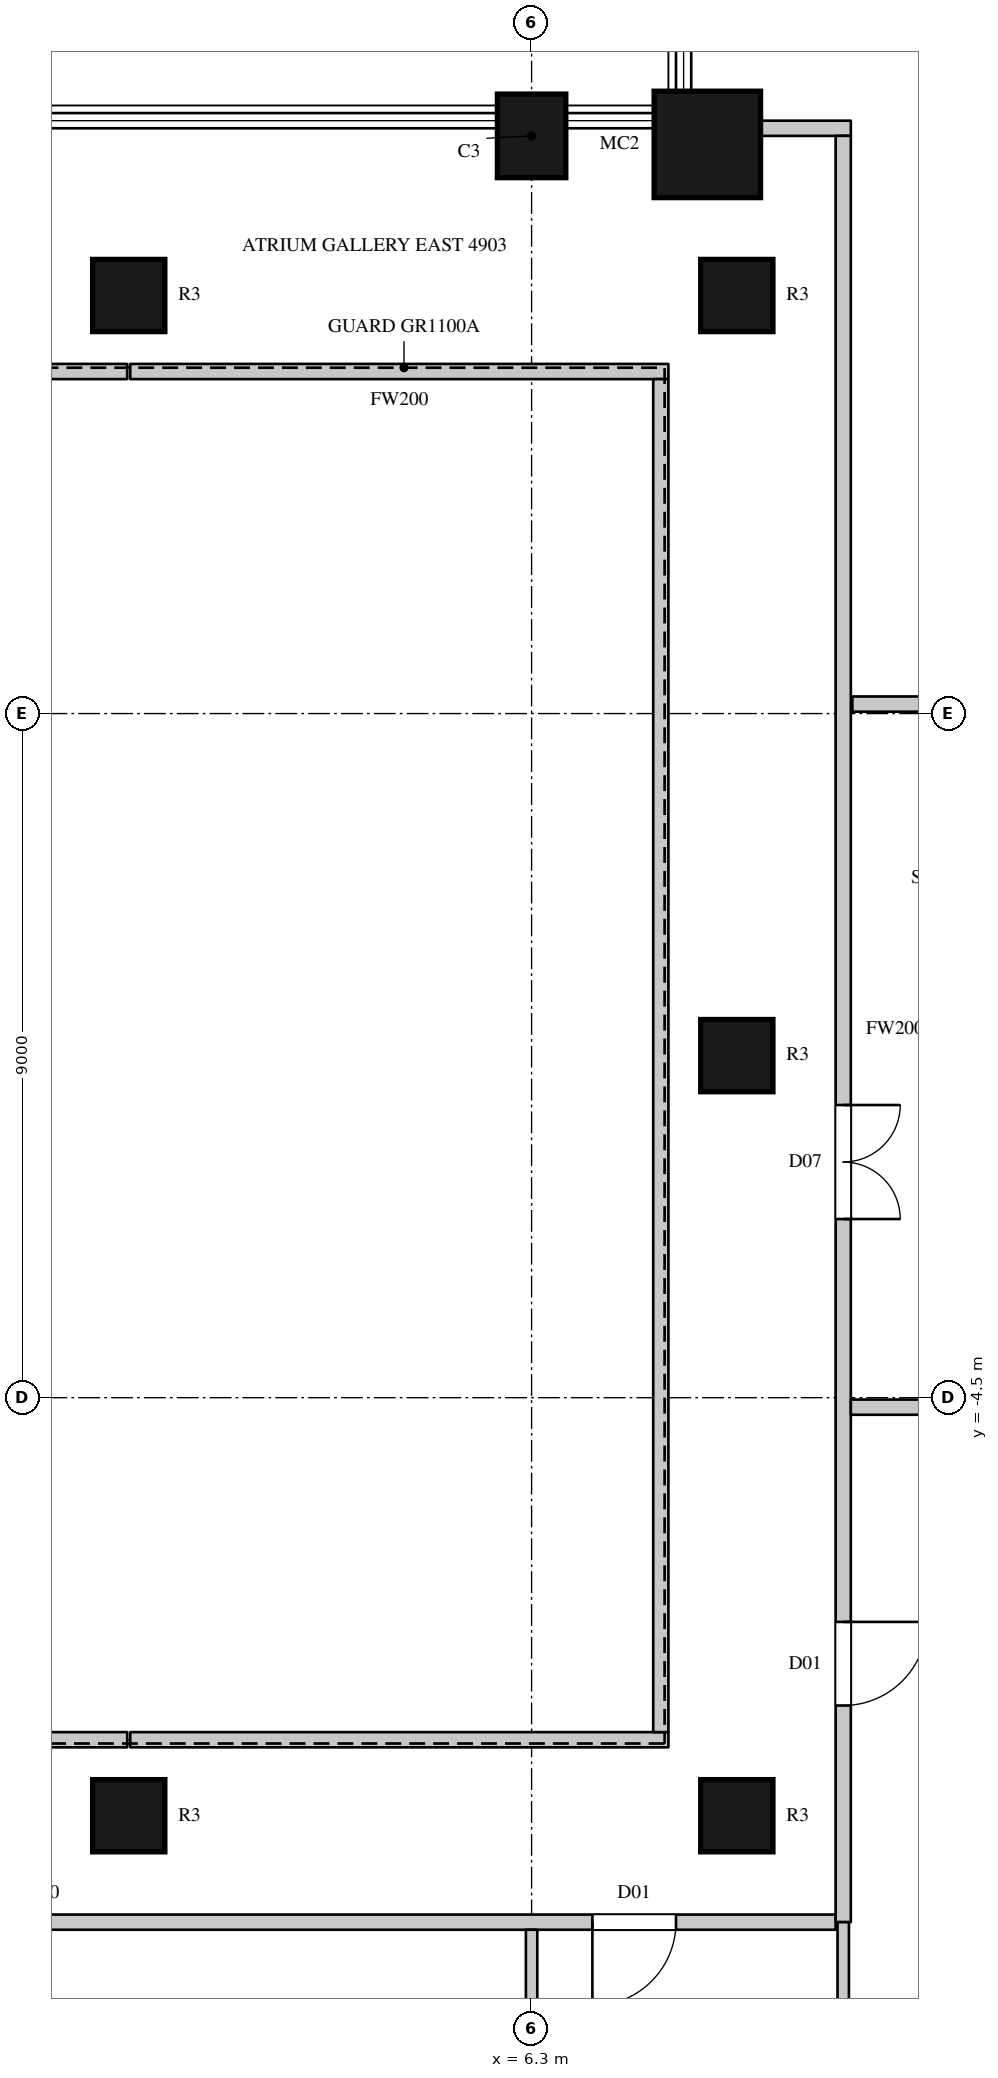
"""IFC4 building model, lengths in metres.
Left out: names, types, materials, properties, quantities, classifications, styles, units other than length and angle.
Written with IfcOpenShell. Run it as: python <this file> out.ifc"""

import sys

from ifc_helpers import new_model, si_unit, direction, frame, frame_2d, origin, origin_2d, place, context, subcontext, project, spatial, rectangle, circle, extrude, element, fill, save


model = new_model("IFC4")
c1 = context("Model", 3, precision=1e-05, world=origin(), true_north=direction((0.0, 1.0)))
c2 = subcontext(c1, "Body", "Model", "MODEL_VIEW")
j1 = project(units=[si_unit("LENGTHUNIT", "METRE"), si_unit("PLANEANGLEUNIT", "RADIAN")], contexts=[c1])
p1 = place(None, origin())
s1 = spatial("IfcSite", under=j1, at=p1, CompositionType="ELEMENT")
p2 = place(p1, origin())
s2 = spatial("IfcBuilding", under=s1, at=p2, CompositionType="ELEMENT")
p3 = place(p2, frame((0.0, 0.0, 222.0)))
s3 = spatial("IfcBuildingStorey", under=s2, at=p3, CompositionType="ELEMENT", Elevation=222.0)
p4 = place(p3, frame((8.612, 11.988, 0.0), z_axis=(0.0, 0.0, 1.0), x_axis=(1.0, 0.0, 0.0)))
e1 = element("IfcColumn", 1, at=p4, inside=s3, PredefinedType="COLUMN", context=c2, shape_type="SweptSolid", body=[
    extrude(circle(Radius=0.7, at=origin_2d()), origin(), (0.0, 0.0, 1.0), 4.1),
])
p5 = place(p3, frame((6.3, 12.1, 0.0), z_axis=(0.0, 0.0, 1.0), x_axis=(-1.0, 0.0, 0.0)))
e2 = element("IfcColumn", 2, at=p5, inside=s3, PredefinedType="COLUMN", context=c2, shape_type="SweptSolid", body=[
    extrude(rectangle(XDim=0.9, YDim=1.1, at=origin_2d()), origin(), (0.0, 0.0, 1.0), 4.1),
])
for number, where, z_axis, x_axis in (
    (3, (1.0, -10.0, 0.0), (0.0, 0.0, 1.0), (1.0, 0.0, 0.0)),
    (4, (1.0, 10.0, 0.0), (0.0, 0.0, 1.0), (1.0, 0.0, 0.0)),
    (5, (9.0, -10.0, 0.0), (0.0, 0.0, 1.0), (1.0, 0.0, 0.0)),
    (6, (9.0, 0.0, 0.0), (0.0, 0.0, 1.0), (1.0, 0.0, 0.0)),
    (7, (9.0, 10.0, 0.0), (0.0, 0.0, 1.0), (1.0, 0.0, 0.0)),
):
    element("IfcColumn", number, at=place(p3, frame(where, z_axis=z_axis, x_axis=x_axis)), inside=s3, PredefinedType="COLUMN", context=c2, shape_type="SweptSolid", body=[
        extrude(circle(Radius=0.475, at=origin_2d()), origin(), (0.0, 0.0, 1.0), 4.1),
    ])
p6 = place(p3, frame((13.941, 11.053, 0.0), z_axis=(0.0, 0.0, 1.0), x_axis=(-0.707106781187, 0.707106781187, 0.0)))
e8 = element("IfcWall", 8, at=p6, inside=s3, PredefinedType="SOLIDWALL", context=c2, shape_type="SweptSolid", body=[
    extrude(rectangle(XDim=6.505, YDim=0.45, at=frame_2d((3.252, 0.0))), origin(), (0.0, 0.0, 1.0), 3.8),
])
p7 = place(p6, frame((0.665, 0.0, 0.0)))
e9 = element("IfcOpeningElement", 9, at=p7, cuts=e8, PredefinedType="OPENING", context=c2, shape_type="SweptSolid", body=[
    extrude(rectangle(XDim=1.8, YDim=2.4, at=frame_2d((0.9, 1.2))), frame((0.0, 0.235, 0.0), z_axis=(0.0, -1.0, 0.0), x_axis=(1.0, 0.0, 0.0)), (0.0, 0.0, 1.0), 0.47),
])
p8 = place(p3, frame((-10.9, -11.4, 0.0), z_axis=(0.0, 0.0, 1.0), x_axis=(1.0, 0.0, 0.0)))
e10 = element("IfcWall", 10, at=p8, inside=s3, PredefinedType="PARTITIONING", context=c2, shape_type="SweptSolid", body=[
    extrude(rectangle(XDim=21.2, YDim=0.2, at=frame_2d((10.6, 0.0))), origin(), (0.0, 0.0, 1.0), 3.8),
])
p9 = place(p8, frame((0.95, 0.0, 0.0)))
e11 = element("IfcOpeningElement", 11, at=p9, cuts=e10, PredefinedType="OPENING", context=c2, shape_type="SweptSolid", body=[
    extrude(rectangle(XDim=0.95, YDim=2.2, at=frame_2d((0.475, 1.1))), frame((0.0, 0.11, 0.0), z_axis=(0.0, -1.0, 0.0), x_axis=(1.0, 0.0, 0.0)), (0.0, 0.0, 1.0), 0.22),
])
p10 = place(p8, frame((4.2, 0.0, 0.0)))
e12 = element("IfcOpeningElement", 12, at=p10, cuts=e10, PredefinedType="OPENING", context=c2, shape_type="SweptSolid", body=[
    extrude(rectangle(XDim=0.9, YDim=2.2, at=frame_2d((0.45, 1.1))), frame((0.0, 0.11, 0.0), z_axis=(0.0, -1.0, 0.0), x_axis=(1.0, 0.0, 0.0)), (0.0, 0.0, 1.0), 0.22),
])
p11 = place(p8, frame((8.35, 0.0, 0.0)))
e13 = element("IfcOpeningElement", 13, at=p11, cuts=e10, PredefinedType="OPENING", context=c2, shape_type="SweptSolid", body=[
    extrude(rectangle(XDim=1.1, YDim=2.4, at=frame_2d((0.55, 1.2))), frame((0.0, 0.11, 0.0), z_axis=(0.0, -1.0, 0.0), x_axis=(1.0, 0.0, 0.0)), (0.0, 0.0, 1.0), 0.22),
])
p12 = place(p8, frame((18.0, 0.0, 0.0)))
e14 = element("IfcOpeningElement", 14, at=p12, cuts=e10, PredefinedType="OPENING", context=c2, shape_type="SweptSolid", body=[
    extrude(rectangle(XDim=1.1, YDim=2.4, at=frame_2d((0.55, 1.2))), frame((0.0, 0.11, 0.0), z_axis=(0.0, -1.0, 0.0), x_axis=(1.0, 0.0, 0.0)), (0.0, 0.0, 1.0), 0.22),
])
for number, where, z_axis, x_axis in (
    (15, (-6.1, -9.0, 0.0), (0.0, 0.0, 1.0), (1.0, 0.0, 0.0)),
    (16, (-6.1, 9.0, 0.0), (0.0, 0.0, 1.0), (1.0, 0.0, 0.0)),
    (17, (1.02, -9.0, 0.0), (0.0, 0.0, 1.0), (1.0, 0.0, 0.0)),
    (18, (1.02, 9.0, 0.0), (0.0, 0.0, 1.0), (1.0, 0.0, 0.0)),
):
    element("IfcWall", number, at=place(p3, frame(where, z_axis=z_axis, x_axis=x_axis)), inside=s3, PredefinedType="PARTITIONING", context=c2, shape_type="SweptSolid", body=[
        extrude(rectangle(XDim=7.08, YDim=0.2, at=frame_2d((3.54, 0.0))), origin(), (0.0, 0.0, 1.0), 3.8),
    ])
p13 = place(p3, frame((8.0, -8.9, 0.0), z_axis=(0.0, 0.0, 1.0), x_axis=(0.0, 1.0, 0.0)))
e19 = element("IfcWall", 19, at=p13, inside=s3, PredefinedType="PARTITIONING", context=c2, shape_type="SweptSolid", body=[
    extrude(rectangle(XDim=17.8, YDim=0.2, at=frame_2d((8.9, 0.0))), origin(), (0.0, 0.0, 1.0), 3.8),
])
p14 = place(p3, frame((9.296, 12.2, 0.0), z_axis=(0.0, 0.0, 1.0), x_axis=(1.0, 0.0, 0.0)))
e20 = element("IfcWall", 20, at=p14, inside=s3, PredefinedType="PARTITIONING", context=c2, shape_type="SweptSolid", body=[
    extrude(rectangle(XDim=1.204, YDim=0.2, at=frame_2d((0.602, 0.0))), origin(), (0.0, 0.0, 1.0), 3.8),
])
p15 = place(p3, frame((10.4, -11.4, 0.0), z_axis=(0.0, 0.0, 1.0), x_axis=(0.0, 1.0, 0.0)))
e21 = element("IfcWall", 21, at=p15, inside=s3, PredefinedType="PARTITIONING", context=c2, shape_type="SweptSolid", body=[
    extrude(rectangle(XDim=23.5, YDim=0.2, at=frame_2d((11.75, 0.0))), origin(), (0.0, 0.0, 1.0), 3.8),
])
p16 = place(p15, frame((9.25, 0.0, 0.0)))
e22 = element("IfcOpeningElement", 22, at=p16, cuts=e21, PredefinedType="OPENING", context=c2, shape_type="SweptSolid", body=[
    extrude(rectangle(XDim=1.5, YDim=2.4, at=frame_2d((0.75, 1.2))), frame((0.0, 0.11, 0.0), z_axis=(0.0, -1.0, 0.0), x_axis=(1.0, 0.0, 0.0)), (0.0, 0.0, 1.0), 0.22),
])
p17 = place(p15, frame((2.85, 0.0, 0.0)))
e23 = element("IfcOpeningElement", 23, at=p17, cuts=e21, PredefinedType="OPENING", context=c2, shape_type="SweptSolid", body=[
    extrude(rectangle(XDim=1.1, YDim=2.4, at=frame_2d((0.55, 1.2))), frame((0.0, 0.11, 0.0), z_axis=(0.0, -1.0, 0.0), x_axis=(1.0, 0.0, 0.0)), (0.0, 0.0, 1.0), 0.22),
])
p18 = place(p3, frame((10.5, -4.625, 0.0), z_axis=(0.0, 0.0, 1.0), x_axis=(1.0, 0.0, 0.0)))
e24 = element("IfcWall", 24, at=p18, inside=s3, PredefinedType="PARTITIONING", context=c2, shape_type="SweptSolid", body=[
    extrude(rectangle(XDim=4.175, YDim=0.2, at=frame_2d((2.087, 0.0))), origin(), (0.0, 0.0, 1.0), 3.8),
])
p19 = place(p3, frame((10.52, 4.625, 0.0), z_axis=(0.0, 0.0, 1.0), x_axis=(1.0, 0.0, 0.0)))
e25 = element("IfcWall", 25, at=p19, inside=s3, PredefinedType="PARTITIONING", context=c2, shape_type="SweptSolid", body=[
    extrude(rectangle(XDim=4.135, YDim=0.2, at=frame_2d((2.067, 0.0))), origin(), (0.0, 0.0, 1.0), 3.8),
])
p20 = place(p3, frame((6.3, -16.05, 0.0), z_axis=(0.0, 0.0, 1.0), x_axis=(0.0, 1.0, 0.0)))
e26 = element("IfcWall", 26, at=p20, inside=s3, PredefinedType="PARTITIONING", context=c2, shape_type="SweptSolid", body=[
    extrude(rectangle(XDim=4.55, YDim=0.15, at=frame_2d((2.275, 0.0))), origin(), (0.0, 0.0, 1.0), 3.25),
])
p21 = place(p3, frame((10.4, -16.7, 0.0), z_axis=(0.0, 0.0, 1.0), x_axis=(0.0, 1.0, 0.0)))
e27 = element("IfcWall", 27, at=p21, inside=s3, PredefinedType="PARTITIONING", context=c2, shape_type="SweptSolid", body=[
    extrude(rectangle(XDim=5.3, YDim=0.15, at=frame_2d((2.65, 0.0))), origin(), (0.0, 0.0, 1.0), 3.8),
])
p22 = place(p16, origin())
e28 = element("IfcDoor", 28, at=p22, inside=s3, OperationType="DOUBLE_DOOR_SINGLE_SWING", PredefinedType="DOOR", context=c2, shape_type="SweptSolid", body=[
    extrude(rectangle(XDim=1.5, YDim=2.4, at=frame_2d((0.75, 1.2))), frame((0.0, 0.025, 0.0), z_axis=(0.0, -1.0, 0.0), x_axis=(1.0, 0.0, 0.0)), (0.0, 0.0, 1.0), 0.05),
])
fill(e22, e28)
p23 = place(p12, origin())
e29 = element("IfcDoor", 29, at=p23, inside=s3, OperationType="SINGLE_SWING_RIGHT", PredefinedType="DOOR", context=c2, shape_type="SweptSolid", body=[
    extrude(rectangle(XDim=1.1, YDim=2.4, at=frame_2d((0.55, 1.2))), frame((0.0, 0.025, 0.0), z_axis=(0.0, -1.0, 0.0), x_axis=(1.0, 0.0, 0.0)), (0.0, 0.0, 1.0), 0.05),
])
fill(e14, e29)
p24 = place(p17, origin())
e30 = element("IfcDoor", 30, at=p24, inside=s3, OperationType="SINGLE_SWING_LEFT", PredefinedType="DOOR", context=c2, shape_type="SweptSolid", body=[
    extrude(rectangle(XDim=1.1, YDim=2.4, at=frame_2d((0.55, 1.2))), frame((0.0, 0.025, 0.0), z_axis=(0.0, -1.0, 0.0), x_axis=(1.0, 0.0, 0.0)), (0.0, 0.0, 1.0), 0.05),
])
fill(e23, e30)
save(model, sys.argv[1])
